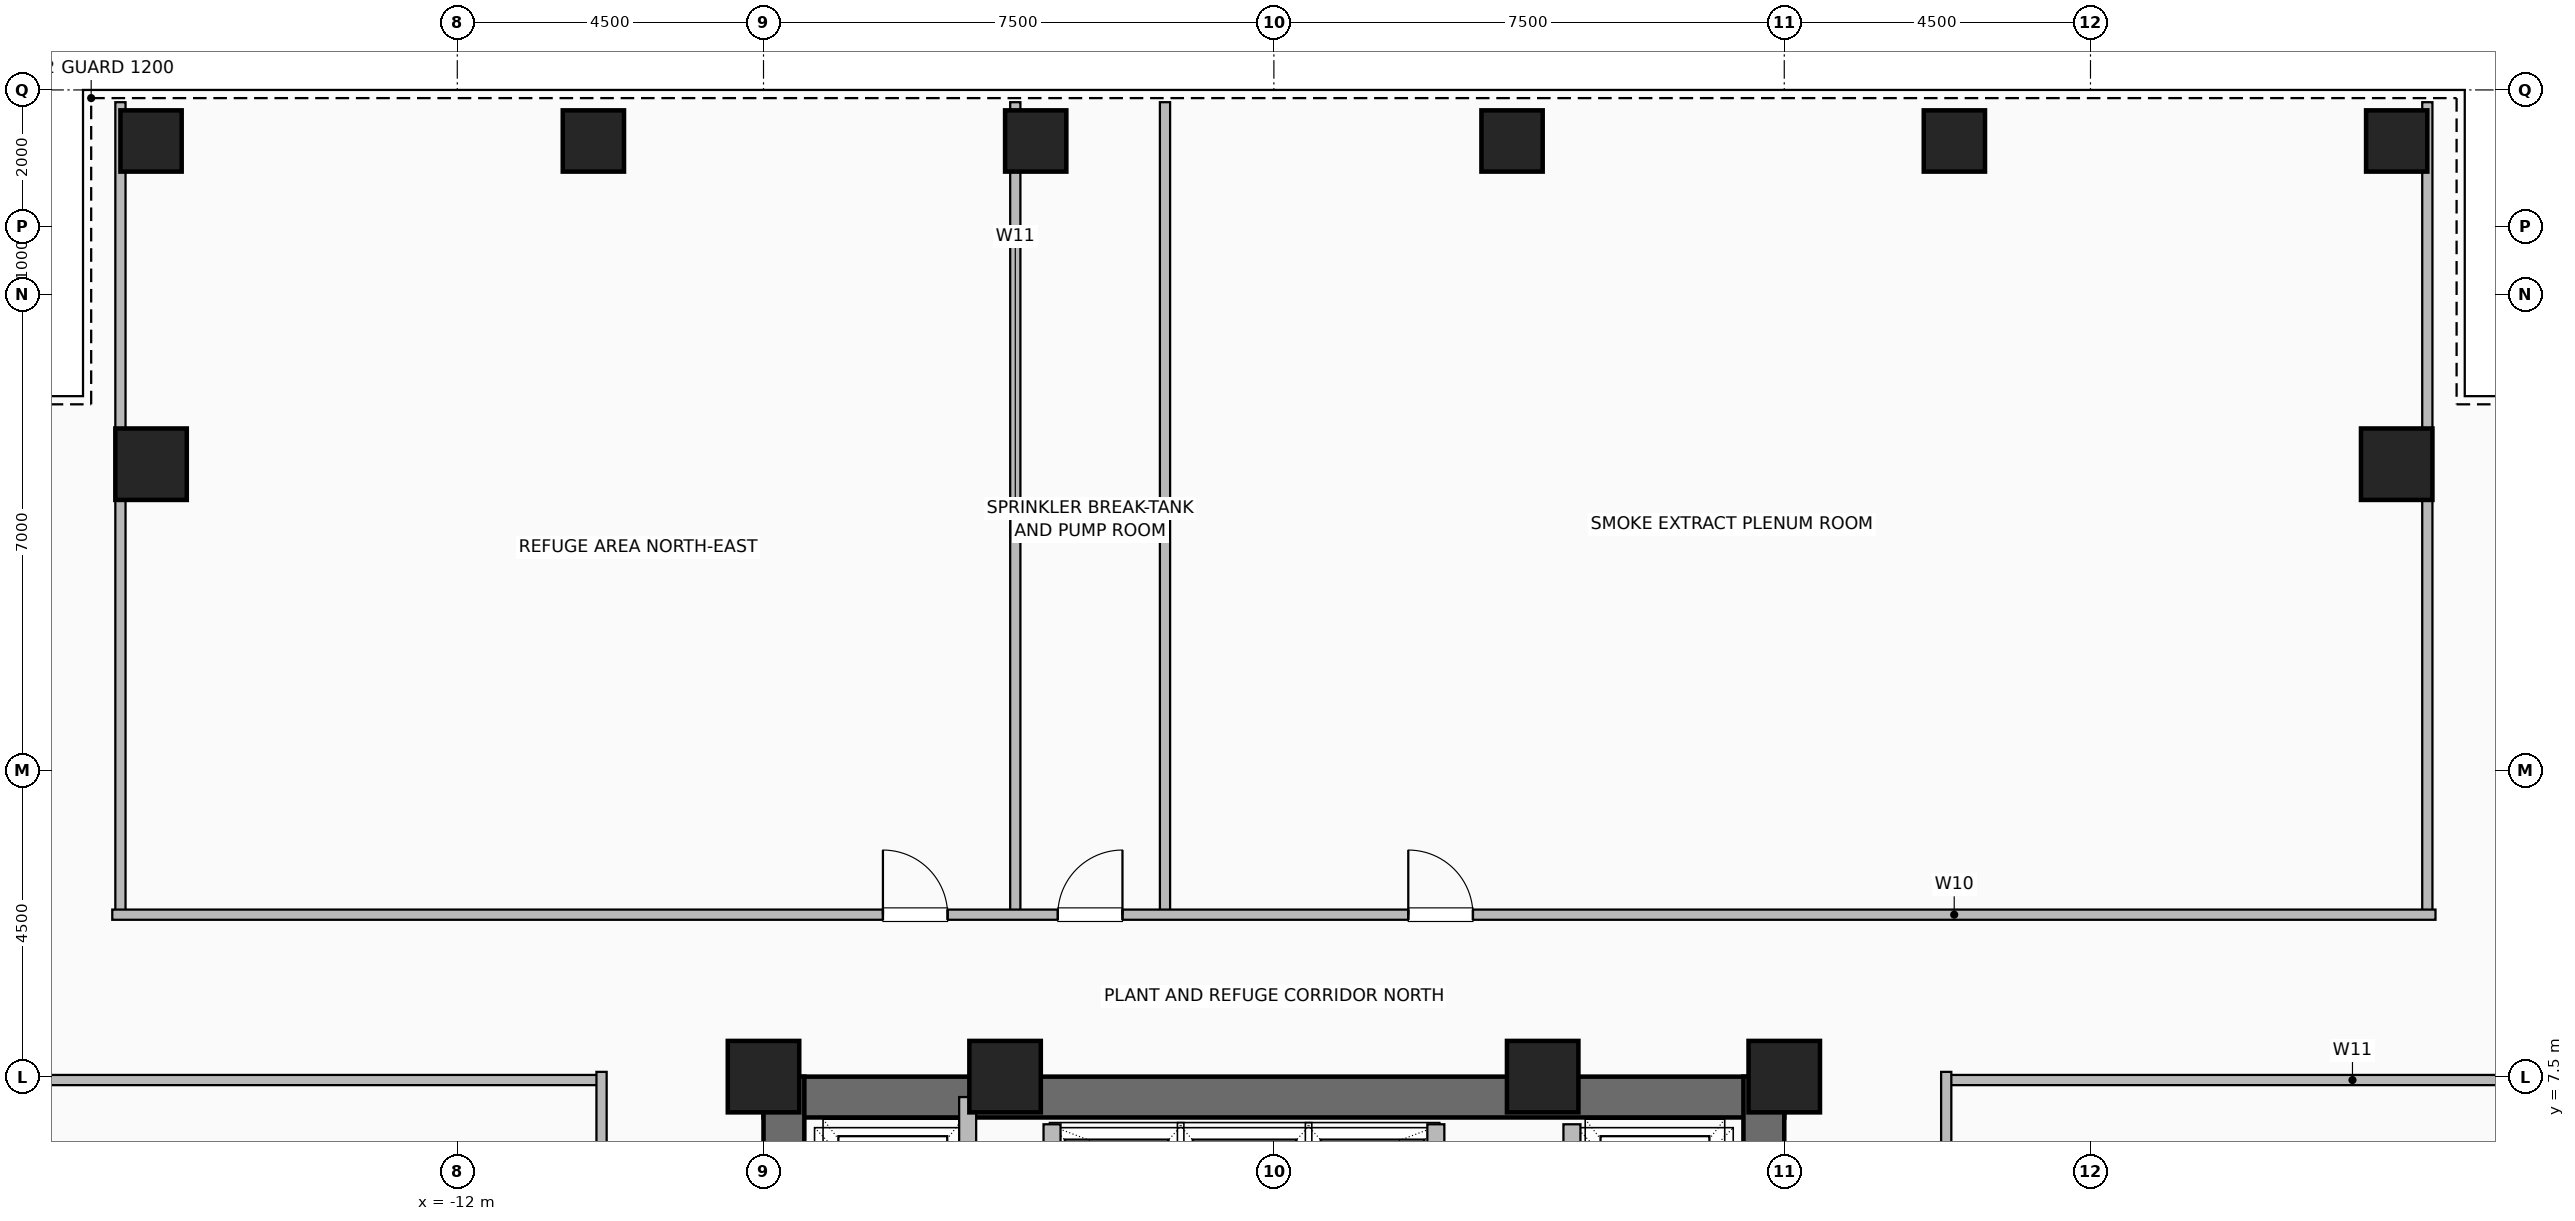
"""IFC4 building model, lengths in metres.
Left out: names, types, materials, properties, quantities, classifications, styles, units other than length and angle.
Written with IfcOpenShell. Run it as: python <this file> out.ifc"""

import sys

from ifc_helpers import new_model, si_unit, direction, frame, frame_2d, origin, origin_2d, place, context, subcontext, project, spatial, rectangle, hollow_rectangle, extrude, element, fill, save


model = new_model("IFC4")
c1 = context("Model", 3, precision=1e-05, world=origin(), true_north=direction((0.0, 1.0)))
c2 = subcontext(c1, "Body", "Model", "MODEL_VIEW")
j1 = project(units=[si_unit("LENGTHUNIT", "METRE"), si_unit("PLANEANGLEUNIT", "RADIAN")], contexts=[c1])
p1 = place(None, origin())
s1 = spatial("IfcSite", under=j1, at=p1, CompositionType="ELEMENT")
p2 = place(p1, origin())
s2 = spatial("IfcBuilding", under=s1, at=p2, CompositionType="ELEMENT")
p3 = place(p2, frame((0.0, 0.0, 160.2)))
s3 = spatial("IfcBuildingStorey", under=s2, at=p3, CompositionType="ELEMENT", Elevation=160.2)
for number, where, z_axis, x_axis in (
    (1, (7.5, 7.5, 0.0), (0.0, 0.0, 1.0), (1.0, 0.0, 0.0)),
    (2, (3.95, 7.5, 0.0), (0.0, 0.0, 1.0), (1.0, 0.0, 0.0)),
    (3, (-3.95, 7.5, 0.0), (0.0, 0.0, 1.0), (1.0, 0.0, 0.0)),
    (4, (-7.5, 7.5, 0.0), (0.0, 0.0, 1.0), (1.0, 0.0, 0.0)),
):
    element("IfcColumn", number, at=place(p3, frame(where, z_axis=z_axis, x_axis=x_axis)), inside=s3, PredefinedType="COLUMN", context=c2, shape_type="SweptSolid", body=[
        extrude(hollow_rectangle(XDim=1.05, YDim=1.05, WallThickness=0.05, at=origin_2d()), origin(), (0.0, 0.0, 1.0), 6.0),
    ])
for number, where, z_axis, x_axis in (
    (5, (-16.5, 21.25, 0.0), (0.0, 0.0, 1.0), (1.0, 0.0, 0.0)),
    (6, (-10.0, 21.25, 0.0), (0.0, 0.0, 1.0), (1.0, 0.0, 0.0)),
    (7, (-3.5, 21.25, 0.0), (0.0, 0.0, 1.0), (1.0, 0.0, 0.0)),
    (8, (3.5, 21.25, 0.0), (0.0, 0.0, 1.0), (1.0, 0.0, 0.0)),
    (9, (10.0, 21.25, 0.0), (0.0, 0.0, 1.0), (1.0, 0.0, 0.0)),
    (10, (16.5, 21.25, 0.0), (0.0, 0.0, 1.0), (1.0, 0.0, 0.0)),
):
    element("IfcColumn", number, at=place(p3, frame(where, z_axis=z_axis, x_axis=x_axis)), inside=s3, PredefinedType="COLUMN", context=c2, shape_type="SweptSolid", body=[
        extrude(hollow_rectangle(XDim=0.9, YDim=0.9, WallThickness=0.045, at=origin_2d()), origin(), (0.0, 0.0, 1.0), 5.6),
    ])
for number, where, z_axis, x_axis in (
    (11, (16.5, 16.5, 0.0), (0.0, 0.0, 1.0), (1.0, 0.0, 0.0)),
    (12, (-16.5, 16.5, 0.0), (0.0, 0.0, 1.0), (1.0, 0.0, 0.0)),
):
    element("IfcColumn", number, at=place(p3, frame(where, z_axis=z_axis, x_axis=x_axis)), inside=s3, PredefinedType="COLUMN", context=c2, shape_type="SweptSolid", body=[
        extrude(hollow_rectangle(XDim=1.05, YDim=1.05, WallThickness=0.05, at=origin_2d()), origin(), (0.0, 0.0, 1.0), 5.6),
    ])
p4 = place(p3, frame((-7.5, 7.2, 0.0), z_axis=(0.0, 0.0, 1.0), x_axis=(1.0, 0.0, 0.0)))
e13 = element("IfcWall", 13, at=p4, inside=s3, PredefinedType="SHEAR", context=c2, shape_type="SweptSolid", body=[
    extrude(rectangle(XDim=15.0, YDim=0.6, at=frame_2d((7.5, 0.0))), origin(), (0.0, 0.0, 1.0), 5.6),
])
p5 = place(p3, frame((-7.2, -7.5, 0.0), z_axis=(0.0, 0.0, 1.0), x_axis=(0.0, 1.0, 0.0)))
e14 = element("IfcWall", 14, at=p5, inside=s3, PredefinedType="SHEAR", context=c2, shape_type="SweptSolid", body=[
    extrude(rectangle(XDim=15.0, YDim=0.6, at=frame_2d((7.5, 0.0))), origin(), (0.0, 0.0, 1.0), 5.6),
])
p6 = place(p5, frame((9.5, 0.0, 0.0)))
e15 = element("IfcOpeningElement", 15, at=p6, cuts=e14, PredefinedType="OPENING", context=c2, shape_type="SweptSolid", body=[
    extrude(rectangle(XDim=1.0, YDim=2.08, at=frame_2d((0.5, 1.04))), frame((0.0, 0.31, 0.0), z_axis=(0.0, -1.0, 0.0), x_axis=(1.0, 0.0, 0.0)), (0.0, 0.0, 1.0), 0.62),
])
p7 = place(p3, frame((7.2, -7.5, 0.0), z_axis=(0.0, 0.0, 1.0), x_axis=(0.0, 1.0, 0.0)))
e16 = element("IfcWall", 16, at=p7, inside=s3, PredefinedType="SHEAR", context=c2, shape_type="SweptSolid", body=[
    extrude(rectangle(XDim=15.0, YDim=0.6, at=frame_2d((7.5, 0.0))), origin(), (0.0, 0.0, 1.0), 5.6),
])
for number, where, z_axis, x_axis in (
    (17, (-3.26, 4.58, 0.0), (0.0, 0.0, 1.0), (0.0, 1.0, 0.0)),
    (18, (2.38, 4.58, 0.0), (0.0, 0.0, 1.0), (0.0, 1.0, 0.0)),
):
    element("IfcWall", number, at=place(p3, frame(where, z_axis=z_axis, x_axis=x_axis)), inside=s3, PredefinedType="SHEAR", context=c2, shape_type="SweptSolid", body=[
        extrude(rectangle(XDim=2.22, YDim=0.25, at=frame_2d((1.11, 0.0))), origin(), (0.0, 0.0, 1.0), 5.6),
    ])
p8 = place(p3, frame((-4.5, 4.35, 0.0), z_axis=(0.0, 0.0, 1.0), x_axis=(0.0, 1.0, 0.0)))
e19 = element("IfcWall", 19, at=p8, inside=s3, PredefinedType="SHEAR", context=c2, shape_type="SweptSolid", body=[
    extrude(rectangle(XDim=2.85, YDim=0.25, at=frame_2d((1.425, 0.0))), origin(), (0.0, 0.0, 1.0), 5.6),
])
p9 = place(p3, frame((4.38, 4.3, 0.0), z_axis=(0.0, 0.0, 1.0), x_axis=(0.0, 1.0, 0.0)))
e20 = element("IfcWall", 20, at=p9, inside=s3, PredefinedType="SHEAR", context=c2, shape_type="SweptSolid", body=[
    extrude(rectangle(XDim=2.5, YDim=0.25, at=frame_2d((1.25, 0.0))), origin(), (0.0, 0.0, 1.0), 5.6),
])
p10 = place(p9, frame((0.8, 0.0, 0.0)))
e21 = element("IfcOpeningElement", 21, at=p10, cuts=e20, PredefinedType="OPENING", context=c2, shape_type="SweptSolid", body=[
    extrude(rectangle(XDim=1.2, YDim=2.2, at=frame_2d((0.6, 1.1))), frame((0.0, 0.135, 0.0), z_axis=(0.0, -1.0, 0.0), x_axis=(1.0, 0.0, 0.0)), (0.0, 0.0, 1.0), 0.27),
])
for number, where, z_axis, x_axis in (
    (22, (-16.95, 9.88, 0.0), (0.0, 0.0, 1.0), (0.0, 1.0, 0.0)),
    (23, (-3.8, 9.88, 0.0), (0.0, 0.0, 1.0), (0.0, 1.0, 0.0)),
    (24, (-1.6, 9.88, 0.0), (0.0, 0.0, 1.0), (0.0, 1.0, 0.0)),
    (25, (16.95, 9.88, 0.0), (0.0, 0.0, 1.0), (0.0, 1.0, 0.0)),
):
    element("IfcWall", number, at=place(p3, frame(where, z_axis=z_axis, x_axis=x_axis)), inside=s3, PredefinedType="PARTITIONING", context=c2, shape_type="SweptSolid", body=[
        extrude(rectangle(XDim=11.94, YDim=0.15, at=frame_2d((5.97, 0.0))), origin(), (0.0, 0.0, 1.0), 5.6),
    ])
p11 = place(p3, frame((-17.07, 9.88, 0.0), z_axis=(0.0, 0.0, 1.0), x_axis=(1.0, 0.0, 0.0)))
e26 = element("IfcWall", 26, at=p11, inside=s3, PredefinedType="PARTITIONING", context=c2, shape_type="SweptSolid", body=[
    extrude(rectangle(XDim=34.14, YDim=0.15, at=frame_2d((17.07, 0.0))), origin(), (0.0, 0.0, 1.0), 5.6),
])
p12 = place(p11, frame((11.325, 0.0, 0.0)))
e27 = element("IfcOpeningElement", 27, at=p12, cuts=e26, PredefinedType="OPENING", context=c2, shape_type="SweptSolid", body=[
    extrude(rectangle(XDim=0.95, YDim=2.06, at=frame_2d((0.475, 1.03))), frame((0.0, 0.085, 0.0), z_axis=(0.0, -1.0, 0.0), x_axis=(1.0, 0.0, 0.0)), (0.0, 0.0, 1.0), 0.17),
])
p13 = place(p11, frame((13.895, 0.0, 0.0)))
e28 = element("IfcOpeningElement", 28, at=p13, cuts=e26, PredefinedType="OPENING", context=c2, shape_type="SweptSolid", body=[
    extrude(rectangle(XDim=0.95, YDim=2.06, at=frame_2d((0.475, 1.03))), frame((0.0, 0.085, 0.0), z_axis=(0.0, -1.0, 0.0), x_axis=(1.0, 0.0, 0.0)), (0.0, 0.0, 1.0), 0.17),
])
p14 = place(p11, frame((19.045, 0.0, 0.0)))
e29 = element("IfcOpeningElement", 29, at=p14, cuts=e26, PredefinedType="OPENING", context=c2, shape_type="SweptSolid", body=[
    extrude(rectangle(XDim=0.95, YDim=2.06, at=frame_2d((0.475, 1.03))), frame((0.0, 0.085, 0.0), z_axis=(0.0, -1.0, 0.0), x_axis=(1.0, 0.0, 0.0)), (0.0, 0.0, 1.0), 0.17),
])
p15 = place(p3, frame((-21.82, 7.45, 0.0), z_axis=(0.0, 0.0, 1.0), x_axis=(1.0, 0.0, 0.0)))
e30 = element("IfcWall", 30, at=p15, inside=s3, PredefinedType="PARTITIONING", context=c2, shape_type="SweptSolid", body=[
    extrude(rectangle(XDim=11.94, YDim=0.15, at=frame_2d((5.97, 0.0))), origin(), (0.0, 0.0, 1.0), 3.975),
])
p16 = place(p3, frame((-9.88, -7.57, 0.0), z_axis=(0.0, 0.0, 1.0), x_axis=(0.0, 1.0, 0.0)))
e31 = element("IfcWall", 31, at=p16, inside=s3, PredefinedType="PARTITIONING", context=c2, shape_type="SweptSolid", body=[
    extrude(rectangle(XDim=15.14, YDim=0.15, at=frame_2d((7.57, 0.0))), origin(), (0.0, 0.0, 1.0), 5.6),
])
p17 = place(p16, frame((4.17, 0.0, 0.0)))
e32 = element("IfcOpeningElement", 32, at=p17, cuts=e31, PredefinedType="OPENING", context=c2, shape_type="SweptSolid", body=[
    extrude(rectangle(XDim=0.95, YDim=2.06, at=frame_2d((0.475, 1.03))), frame((0.0, 0.085, 0.0), z_axis=(0.0, -1.0, 0.0), x_axis=(1.0, 0.0, 0.0)), (0.0, 0.0, 1.0), 0.17),
])
p18 = place(p16, frame((11.62, 0.0, 0.0)))
e33 = element("IfcOpeningElement", 33, at=p18, cuts=e31, PredefinedType="OPENING", context=c2, shape_type="SweptSolid", body=[
    extrude(rectangle(XDim=0.95, YDim=2.06, at=frame_2d((0.475, 1.03))), frame((0.0, 0.085, 0.0), z_axis=(0.0, -1.0, 0.0), x_axis=(1.0, 0.0, 0.0)), (0.0, 0.0, 1.0), 0.17),
])
p19 = place(p3, frame((9.88, 7.45, 0.0), z_axis=(0.0, 0.0, 1.0), x_axis=(1.0, 0.0, 0.0)))
e34 = element("IfcWall", 34, at=p19, inside=s3, PredefinedType="PARTITIONING", context=c2, shape_type="SweptSolid", body=[
    extrude(rectangle(XDim=11.94, YDim=0.15, at=frame_2d((5.97, 0.0))), origin(), (0.0, 0.0, 1.0), 3.975),
])
p20 = place(p3, frame((9.88, -7.57, 0.0), z_axis=(0.0, 0.0, 1.0), x_axis=(0.0, 1.0, 0.0)))
e35 = element("IfcWall", 35, at=p20, inside=s3, PredefinedType="PARTITIONING", context=c2, shape_type="SweptSolid", body=[
    extrude(rectangle(XDim=15.14, YDim=0.15, at=frame_2d((7.57, 0.0))), origin(), (0.0, 0.0, 1.0), 5.6),
])
p21 = place(p20, frame((4.17, 0.0, 0.0)))
e36 = element("IfcOpeningElement", 36, at=p21, cuts=e35, PredefinedType="OPENING", context=c2, shape_type="SweptSolid", body=[
    extrude(rectangle(XDim=0.95, YDim=2.06, at=frame_2d((0.475, 1.03))), frame((0.0, 0.085, 0.0), z_axis=(0.0, -1.0, 0.0), x_axis=(1.0, 0.0, 0.0)), (0.0, 0.0, 1.0), 0.17),
])
p22 = place(p20, frame((11.62, 0.0, 0.0)))
e37 = element("IfcOpeningElement", 37, at=p22, cuts=e35, PredefinedType="OPENING", context=c2, shape_type="SweptSolid", body=[
    extrude(rectangle(XDim=0.95, YDim=2.06, at=frame_2d((0.475, 1.03))), frame((0.0, 0.085, 0.0), z_axis=(0.0, -1.0, 0.0), x_axis=(1.0, 0.0, 0.0)), (0.0, 0.0, 1.0), 0.17),
])
p23 = place(p12, origin())
e38 = element("IfcDoor", 38, at=p23, inside=s3, OperationType="SINGLE_SWING_LEFT", PredefinedType="DOOR", context=c2, shape_type="SweptSolid", body=[
    extrude(rectangle(XDim=0.95, YDim=2.06, at=frame_2d((0.475, 1.03))), frame((0.0, 0.025, 0.0), z_axis=(0.0, -1.0, 0.0), x_axis=(1.0, 0.0, 0.0)), (0.0, 0.0, 1.0), 0.05),
])
fill(e27, e38)
p24 = place(p13, origin())
e39 = element("IfcDoor", 39, at=p24, inside=s3, OperationType="SINGLE_SWING_RIGHT", PredefinedType="DOOR", context=c2, shape_type="SweptSolid", body=[
    extrude(rectangle(XDim=0.95, YDim=2.06, at=frame_2d((0.475, 1.03))), frame((0.0, 0.025, 0.0), z_axis=(0.0, -1.0, 0.0), x_axis=(1.0, 0.0, 0.0)), (0.0, 0.0, 1.0), 0.05),
])
fill(e28, e39)
p25 = place(p14, origin())
e40 = element("IfcDoor", 40, at=p25, inside=s3, OperationType="SINGLE_SWING_LEFT", PredefinedType="DOOR", context=c2, shape_type="SweptSolid", body=[
    extrude(rectangle(XDim=0.95, YDim=2.06, at=frame_2d((0.475, 1.03))), frame((0.0, 0.025, 0.0), z_axis=(0.0, -1.0, 0.0), x_axis=(1.0, 0.0, 0.0)), (0.0, 0.0, 1.0), 0.05),
])
fill(e29, e40)
save(model, sys.argv[1])
